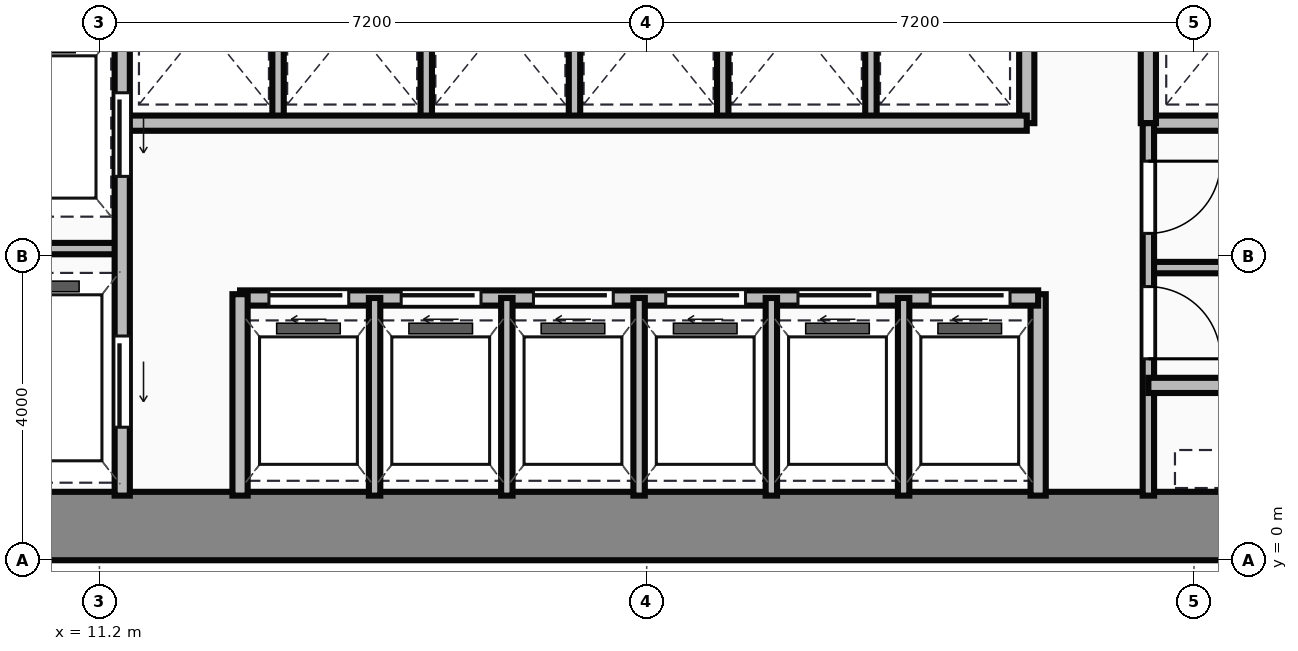
"""IFC4 building model, lengths in metres.
Left out: names, types, materials, properties, quantities, classifications, styles, units other than length and angle.
Written with IfcOpenShell. Run it as: python <this file> out.ifc"""

import sys

from ifc_helpers import new_model, si_unit, direction, frame, frame_2d, origin, place, context, subcontext, project, spatial, rectangle, extrude, source, transform, mapped, element, fill, save


model = new_model("IFC4")
c1 = context("Model", 3, precision=1e-05, world=origin(), true_north=direction((0.0, 1.0)))
c2 = subcontext(c1, "Body", "Model", "MODEL_VIEW")
j1 = project(units=[si_unit("LENGTHUNIT", "METRE"), si_unit("PLANEANGLEUNIT", "RADIAN")], contexts=[c1])
p1 = place(None, origin())
s1 = spatial("IfcSite", under=j1, at=p1, CompositionType="ELEMENT")
p2 = place(p1, origin())
s2 = spatial("IfcBuilding", under=s1, at=p2, CompositionType="ELEMENT")
p3 = place(p2, frame((0.0, 0.0, 76.3)))
s3 = spatial("IfcBuildingStorey", under=s2, at=p3, CompositionType="ELEMENT", Elevation=76.3)
m1 = source(origin(), c2, "Body", "SweptSolid", [
    extrude(rectangle(XDim=29.5, YDim=0.9, at=frame_2d((14.75, 0.0))), origin(), (0.0, 0.0, 1.0), 3.65),
])
p4 = place(p3, frame((4.5, 0.45, 0.0), z_axis=(0.0, 0.0, 1.0), x_axis=(1.0, 0.0, 0.0)))
e1 = element("IfcWall", 1, at=p4, inside=s3, PredefinedType="SHEAR", context=c2, shape_type="MappedRepresentation", body=[
    mapped(m1, transform((0.0, 0.0, 0.0))),
])
m2 = source(origin(), c2, "Body", "SweptSolid", [
    extrude(rectangle(XDim=9.6, YDim=0.2, at=frame_2d((4.8, 0.0))), origin(), (0.0, 0.0, 1.0), 3.4),
])
p5 = place(p3, frame((11.5, 0.85, 0.0), z_axis=(0.0, 0.0, 1.0), x_axis=(0.0, 1.0, 0.0)))
e2 = element("IfcWall", 2, at=p5, inside=s3, PredefinedType="PARTITIONING", context=c2, shape_type="MappedRepresentation", body=[
    mapped(m2, transform((0.0, 0.0, 0.0))),
])
p6 = place(p5, frame((4.2, 0.0, 0.0)))
e3 = element("IfcOpeningElement", 3, at=p6, cuts=e2, PredefinedType="OPENING", context=c2, shape_type="SweptSolid", body=[
    extrude(rectangle(XDim=1.1, YDim=2.15, at=frame_2d((0.55, 1.075))), frame((0.0, 0.11, 0.0), z_axis=(0.0, -1.0, 0.0), x_axis=(1.0, 0.0, 0.0)), (0.0, 0.0, 1.0), 0.22),
])
p7 = place(p5, frame((0.9, 0.0, 0.0)))
e4 = element("IfcOpeningElement", 4, at=p7, cuts=e2, PredefinedType="OPENING", context=c2, shape_type="SweptSolid", body=[
    extrude(rectangle(XDim=1.2, YDim=2.15, at=frame_2d((0.6, 1.075))), frame((0.0, 0.11, 0.0), z_axis=(0.0, -1.0, 0.0), x_axis=(1.0, 0.0, 0.0)), (0.0, 0.0, 1.0), 0.22),
])
m3 = source(origin(), c2, "Body", "SweptSolid", [
    extrude(rectangle(XDim=2.4, YDim=0.15, at=frame_2d((1.2, 0.0))), origin(), (0.0, 0.0, 1.0), 3.4),
])
p8 = place(p3, frame((9.1, 4.1, 0.0), z_axis=(0.0, 0.0, 1.0), x_axis=(1.0, 0.0, 0.0)))
e5 = element("IfcWall", 5, at=p8, inside=s3, PredefinedType="PARTITIONING", context=c2, shape_type="MappedRepresentation", body=[
    mapped(m3, transform((0.0, 0.0, 0.0))),
])
m4 = source(origin(), c2, "Body", "SweptSolid", [
    extrude(rectangle(XDim=2.65, YDim=0.2, at=frame_2d((1.325, 0.0))), origin(), (0.0, 0.0, 1.0), 3.4),
])
p9 = place(p3, frame((13.05, 0.85, 0.0), z_axis=(0.0, 0.0, 1.0), x_axis=(0.0, 1.0, 0.0)))
e6 = element("IfcWall", 6, at=p9, inside=s3, PredefinedType="PARTITIONING", context=c2, shape_type="MappedRepresentation", body=[
    mapped(m4, transform((0.0, 0.0, 0.0))),
])
m5 = source(origin(), c2, "Body", "SweptSolid", [
    extrude(rectangle(XDim=10.5, YDim=0.2, at=frame_2d((5.25, 0.0))), origin(), (0.0, 0.0, 1.0), 3.4),
])
p10 = place(p3, frame((13.05, 3.45, 0.0), z_axis=(0.0, 0.0, 1.0), x_axis=(1.0, 0.0, 0.0)))
e7 = element("IfcWall", 7, at=p10, inside=s3, PredefinedType="PARTITIONING", context=c2, shape_type="MappedRepresentation", body=[
    mapped(m5, transform((0.0, 0.0, 0.0))),
])
p11 = place(p10, frame((0.38, 0.0, 0.0)))
e8 = element("IfcOpeningElement", 8, at=p11, cuts=e7, PredefinedType="OPENING", context=c2, shape_type="SweptSolid", body=[
    extrude(rectangle(XDim=1.05, YDim=2.15, at=frame_2d((0.525, 1.075))), frame((0.0, 0.11, 0.0), z_axis=(0.0, -1.0, 0.0), x_axis=(1.0, 0.0, 0.0)), (0.0, 0.0, 1.0), 0.22),
])
p12 = place(p10, frame((2.12, 0.0, 0.0)))
e9 = element("IfcOpeningElement", 9, at=p12, cuts=e7, PredefinedType="OPENING", context=c2, shape_type="SweptSolid", body=[
    extrude(rectangle(XDim=1.05, YDim=2.15, at=frame_2d((0.525, 1.075))), frame((0.0, 0.11, 0.0), z_axis=(0.0, -1.0, 0.0), x_axis=(1.0, 0.0, 0.0)), (0.0, 0.0, 1.0), 0.22),
])
p13 = place(p10, frame((3.86, 0.0, 0.0)))
e10 = element("IfcOpeningElement", 10, at=p13, cuts=e7, PredefinedType="OPENING", context=c2, shape_type="SweptSolid", body=[
    extrude(rectangle(XDim=1.05, YDim=2.15, at=frame_2d((0.525, 1.075))), frame((0.0, 0.11, 0.0), z_axis=(0.0, -1.0, 0.0), x_axis=(1.0, 0.0, 0.0)), (0.0, 0.0, 1.0), 0.22),
])
p14 = place(p10, frame((5.6, 0.0, 0.0)))
e11 = element("IfcOpeningElement", 11, at=p14, cuts=e7, PredefinedType="OPENING", context=c2, shape_type="SweptSolid", body=[
    extrude(rectangle(XDim=1.05, YDim=2.15, at=frame_2d((0.525, 1.075))), frame((0.0, 0.11, 0.0), z_axis=(0.0, -1.0, 0.0), x_axis=(1.0, 0.0, 0.0)), (0.0, 0.0, 1.0), 0.22),
])
p15 = place(p10, frame((7.34, 0.0, 0.0)))
e12 = element("IfcOpeningElement", 12, at=p15, cuts=e7, PredefinedType="OPENING", context=c2, shape_type="SweptSolid", body=[
    extrude(rectangle(XDim=1.05, YDim=2.15, at=frame_2d((0.525, 1.075))), frame((0.0, 0.11, 0.0), z_axis=(0.0, -1.0, 0.0), x_axis=(1.0, 0.0, 0.0)), (0.0, 0.0, 1.0), 0.22),
])
p16 = place(p10, frame((9.08, 0.0, 0.0)))
e13 = element("IfcOpeningElement", 13, at=p16, cuts=e7, PredefinedType="OPENING", context=c2, shape_type="SweptSolid", body=[
    extrude(rectangle(XDim=1.05, YDim=2.15, at=frame_2d((0.525, 1.075))), frame((0.0, 0.11, 0.0), z_axis=(0.0, -1.0, 0.0), x_axis=(1.0, 0.0, 0.0)), (0.0, 0.0, 1.0), 0.22),
])
p17 = place(p3, frame((23.55, 0.85, 0.0), z_axis=(0.0, 0.0, 1.0), x_axis=(0.0, 1.0, 0.0)))
e14 = element("IfcWall", 14, at=p17, inside=s3, PredefinedType="PARTITIONING", context=c2, shape_type="MappedRepresentation", body=[
    mapped(m4, transform((0.0, 0.0, 0.0))),
])
m6 = source(origin(), c2, "Body", "SweptSolid", [
    extrude(rectangle(XDim=2.6, YDim=0.15, at=frame_2d((1.3, 0.0))), origin(), (0.0, 0.0, 1.0), 3.4),
])
for number, where, z_axis, x_axis in (
    (15, (14.82, 0.85, 0.0), (0.0, 0.0, 1.0), (0.0, 1.0, 0.0)),
    (16, (16.56, 0.85, 0.0), (0.0, 0.0, 1.0), (0.0, 1.0, 0.0)),
    (17, (18.3, 0.85, 0.0), (0.0, 0.0, 1.0), (0.0, 1.0, 0.0)),
    (18, (20.04, 0.85, 0.0), (0.0, 0.0, 1.0), (0.0, 1.0, 0.0)),
    (19, (21.78, 0.85, 0.0), (0.0, 0.0, 1.0), (0.0, 1.0, 0.0)),
):
    element("IfcWall", number, at=place(p3, frame(where, z_axis=z_axis, x_axis=x_axis)), inside=s3, PredefinedType="PARTITIONING", context=c2, shape_type="MappedRepresentation", body=[
        mapped(m6, transform((0.0, 0.0, 0.0))),
    ])
m7 = source(origin(), c2, "Body", "SweptSolid", [
    extrude(rectangle(XDim=11.85, YDim=0.2, at=frame_2d((5.925, 0.0))), origin(), (0.0, 0.0, 1.0), 3.4),
])
p18 = place(p3, frame((11.55, 5.75, 0.0), z_axis=(0.0, 0.0, 1.0), x_axis=(1.0, 0.0, 0.0)))
e20 = element("IfcWall", 20, at=p18, inside=s3, PredefinedType="PARTITIONING", context=c2, shape_type="MappedRepresentation", body=[
    mapped(m7, transform((0.0, 0.0, 0.0))),
])
m8 = source(origin(), c2, "Body", "SweptSolid", [
    extrude(rectangle(XDim=2.6, YDim=0.2, at=frame_2d((1.3, 0.0))), origin(), (0.0, 0.0, 1.0), 3.4),
])
p19 = place(p3, frame((23.4, 5.75, 0.0), z_axis=(0.0, 0.0, 1.0), x_axis=(0.0, 1.0, 0.0)))
e21 = element("IfcWall", 21, at=p19, inside=s3, PredefinedType="PARTITIONING", context=c2, shape_type="MappedRepresentation", body=[
    mapped(m8, transform((0.0, 0.0, 0.0))),
])
m9 = source(origin(), c2, "Body", "SweptSolid", [
    extrude(rectangle(XDim=2.5, YDim=0.15, at=frame_2d((1.25, 0.0))), origin(), (0.0, 0.0, 1.0), 3.4),
])
for number, where, z_axis, x_axis in (
    (22, (13.55, 5.8, 0.0), (0.0, 0.0, 1.0), (0.0, 1.0, 0.0)),
    (23, (15.5, 5.8, 0.0), (0.0, 0.0, 1.0), (0.0, 1.0, 0.0)),
    (24, (17.45, 5.8, 0.0), (0.0, 0.0, 1.0), (0.0, 1.0, 0.0)),
    (25, (19.4, 5.8, 0.0), (0.0, 0.0, 1.0), (0.0, 1.0, 0.0)),
    (26, (21.35, 5.8, 0.0), (0.0, 0.0, 1.0), (0.0, 1.0, 0.0)),
):
    element("IfcWall", number, at=place(p3, frame(where, z_axis=z_axis, x_axis=x_axis)), inside=s3, PredefinedType="PARTITIONING", context=c2, shape_type="MappedRepresentation", body=[
        mapped(m9, transform((0.0, 0.0, 0.0))),
    ])
m10 = source(origin(), c2, "Body", "SweptSolid", [
    extrude(rectangle(XDim=4.55, YDim=0.2, at=frame_2d((2.275, 0.0))), origin(), (0.0, 0.0, 1.0), 3.4),
])
p20 = place(p3, frame((25.0, 5.75, 0.0), z_axis=(0.0, 0.0, 1.0), x_axis=(1.0, 0.0, 0.0)))
e27 = element("IfcWall", 27, at=p20, inside=s3, PredefinedType="PARTITIONING", context=c2, shape_type="MappedRepresentation", body=[
    mapped(m10, transform((0.0, 0.0, 0.0))),
])
p21 = place(p3, frame((25.0, 5.75, 0.0), z_axis=(0.0, 0.0, 1.0), x_axis=(0.0, 1.0, 0.0)))
e28 = element("IfcWall", 28, at=p21, inside=s3, PredefinedType="PARTITIONING", context=c2, shape_type="MappedRepresentation", body=[
    mapped(m8, transform((0.0, 0.0, 0.0))),
])
m11 = source(origin(), c2, "Body", "SweptSolid", [
    extrude(rectangle(XDim=4.9, YDim=0.15, at=frame_2d((2.45, 0.0))), origin(), (0.0, 0.0, 1.0), 3.4),
])
p22 = place(p3, frame((25.0, 0.85, 0.0), z_axis=(0.0, 0.0, 1.0), x_axis=(0.0, 1.0, 0.0)))
e29 = element("IfcWall", 29, at=p22, inside=s3, PredefinedType="PARTITIONING", context=c2, shape_type="MappedRepresentation", body=[
    mapped(m11, transform((0.0, 0.0, 0.0))),
])
p23 = place(p22, frame((1.8, 0.0, 0.0)))
e30 = element("IfcOpeningElement", 30, at=p23, cuts=e29, PredefinedType="OPENING", context=c2, shape_type="SweptSolid", body=[
    extrude(rectangle(XDim=0.95, YDim=2.15, at=frame_2d((0.475, 1.075))), frame((0.0, 0.085, 0.0), z_axis=(0.0, -1.0, 0.0), x_axis=(1.0, 0.0, 0.0)), (0.0, 0.0, 1.0), 0.17),
])
p24 = place(p22, frame((3.45, 0.0, 0.0)))
e31 = element("IfcOpeningElement", 31, at=p24, cuts=e29, PredefinedType="OPENING", context=c2, shape_type="SweptSolid", body=[
    extrude(rectangle(XDim=0.95, YDim=2.15, at=frame_2d((0.475, 1.075))), frame((0.0, 0.085, 0.0), z_axis=(0.0, -1.0, 0.0), x_axis=(1.0, 0.0, 0.0)), (0.0, 0.0, 1.0), 0.17),
])
m12 = source(origin(), c2, "Body", "SweptSolid", [
    extrude(rectangle(XDim=2.4, YDim=0.2, at=frame_2d((1.2, 0.0))), origin(), (0.0, 0.0, 1.0), 3.4),
])
p25 = place(p3, frame((25.0, 2.3, 0.0), z_axis=(0.0, 0.0, 1.0), x_axis=(1.0, 0.0, 0.0)))
e32 = element("IfcWall", 32, at=p25, inside=s3, PredefinedType="PARTITIONING", context=c2, shape_type="MappedRepresentation", body=[
    mapped(m12, transform((0.0, 0.0, 0.0))),
])
m13 = source(origin(), c2, "Body", "SweptSolid", [
    extrude(rectangle(XDim=4.55, YDim=0.15, at=frame_2d((2.275, 0.0))), origin(), (0.0, 0.0, 1.0), 3.4),
])
p26 = place(p3, frame((25.0, 3.85, 0.0), z_axis=(0.0, 0.0, 1.0), x_axis=(1.0, 0.0, 0.0)))
e33 = element("IfcWall", 33, at=p26, inside=s3, PredefinedType="PARTITIONING", context=c2, shape_type="MappedRepresentation", body=[
    mapped(m13, transform((0.0, 0.0, 0.0))),
])
m14 = source(origin(), c2, "Body", "SweptSolid", [
    extrude(rectangle(XDim=1.1, YDim=2.15, at=frame_2d((0.55, 1.075))), frame((0.0, 0.025, 0.0), z_axis=(0.0, -1.0, 0.0), x_axis=(1.0, 0.0, 0.0)), (0.0, 0.0, 1.0), 0.05),
])
p27 = place(p6, frame((1.1, 0.0, 0.0), z_axis=(0.0, 0.0, 1.0), x_axis=(-1.0, 0.0, 0.0)))
e34 = element("IfcDoor", 34, at=p27, inside=s3, OperationType="SLIDING_TO_LEFT", PredefinedType="DOOR", context=c2, shape_type="MappedRepresentation", body=[
    mapped(m14, transform((0.0, 0.0, 0.0))),
])
fill(e3, e34)
m15 = source(origin(), c2, "Body", "SweptSolid", [
    extrude(rectangle(XDim=1.2, YDim=2.15, at=frame_2d((0.6, 1.075))), frame((0.0, 0.025, 0.0), z_axis=(0.0, -1.0, 0.0), x_axis=(1.0, 0.0, 0.0)), (0.0, 0.0, 1.0), 0.05),
])
p28 = place(p7, frame((1.2, 0.0, 0.0), z_axis=(0.0, 0.0, 1.0), x_axis=(-1.0, 0.0, 0.0)))
e35 = element("IfcDoor", 35, at=p28, inside=s3, OperationType="SLIDING_TO_LEFT", PredefinedType="DOOR", context=c2, shape_type="MappedRepresentation", body=[
    mapped(m15, transform((0.0, 0.0, 0.0))),
])
fill(e4, e35)
m16 = source(origin(), c2, "Body", "SweptSolid", [
    extrude(rectangle(XDim=1.05, YDim=2.15, at=frame_2d((0.525, 1.075))), frame((0.0, 0.025, 0.0), z_axis=(0.0, -1.0, 0.0), x_axis=(1.0, 0.0, 0.0)), (0.0, 0.0, 1.0), 0.05),
])
p29 = place(p11, origin())
e36 = element("IfcDoor", 36, at=p29, inside=s3, OperationType="SLIDING_TO_LEFT", PredefinedType="DOOR", context=c2, shape_type="MappedRepresentation", body=[
    mapped(m16, transform((0.0, 0.0, 0.0))),
])
fill(e8, e36)
p30 = place(p12, origin())
e37 = element("IfcDoor", 37, at=p30, inside=s3, OperationType="SLIDING_TO_LEFT", PredefinedType="DOOR", context=c2, shape_type="MappedRepresentation", body=[
    mapped(m16, transform((0.0, 0.0, 0.0))),
])
fill(e9, e37)
p31 = place(p13, origin())
e38 = element("IfcDoor", 38, at=p31, inside=s3, OperationType="SLIDING_TO_LEFT", PredefinedType="DOOR", context=c2, shape_type="MappedRepresentation", body=[
    mapped(m16, transform((0.0, 0.0, 0.0))),
])
fill(e10, e38)
p32 = place(p14, origin())
e39 = element("IfcDoor", 39, at=p32, inside=s3, OperationType="SLIDING_TO_LEFT", PredefinedType="DOOR", context=c2, shape_type="MappedRepresentation", body=[
    mapped(m16, transform((0.0, 0.0, 0.0))),
])
fill(e11, e39)
p33 = place(p15, origin())
e40 = element("IfcDoor", 40, at=p33, inside=s3, OperationType="SLIDING_TO_LEFT", PredefinedType="DOOR", context=c2, shape_type="MappedRepresentation", body=[
    mapped(m16, transform((0.0, 0.0, 0.0))),
])
fill(e12, e40)
p34 = place(p16, origin())
e41 = element("IfcDoor", 41, at=p34, inside=s3, OperationType="SLIDING_TO_LEFT", PredefinedType="DOOR", context=c2, shape_type="MappedRepresentation", body=[
    mapped(m16, transform((0.0, 0.0, 0.0))),
])
fill(e13, e41)
m17 = source(origin(), c2, "Body", "SweptSolid", [
    extrude(rectangle(XDim=0.95, YDim=2.15, at=frame_2d((0.475, 1.075))), frame((0.0, 0.025, 0.0), z_axis=(0.0, -1.0, 0.0), x_axis=(1.0, 0.0, 0.0)), (0.0, 0.0, 1.0), 0.05),
])
p35 = place(p23, origin())
e42 = element("IfcDoor", 42, at=p35, inside=s3, OperationType="SINGLE_SWING_LEFT", PredefinedType="DOOR", context=c2, shape_type="MappedRepresentation", body=[
    mapped(m17, transform((0.0, 0.0, 0.0))),
])
fill(e30, e42)
p36 = place(p24, origin())
e43 = element("IfcDoor", 43, at=p36, inside=s3, OperationType="SINGLE_SWING_RIGHT", PredefinedType="DOOR", context=c2, shape_type="MappedRepresentation", body=[
    mapped(m17, transform((0.0, 0.0, 0.0))),
])
fill(e31, e43)
save(model, sys.argv[1])
